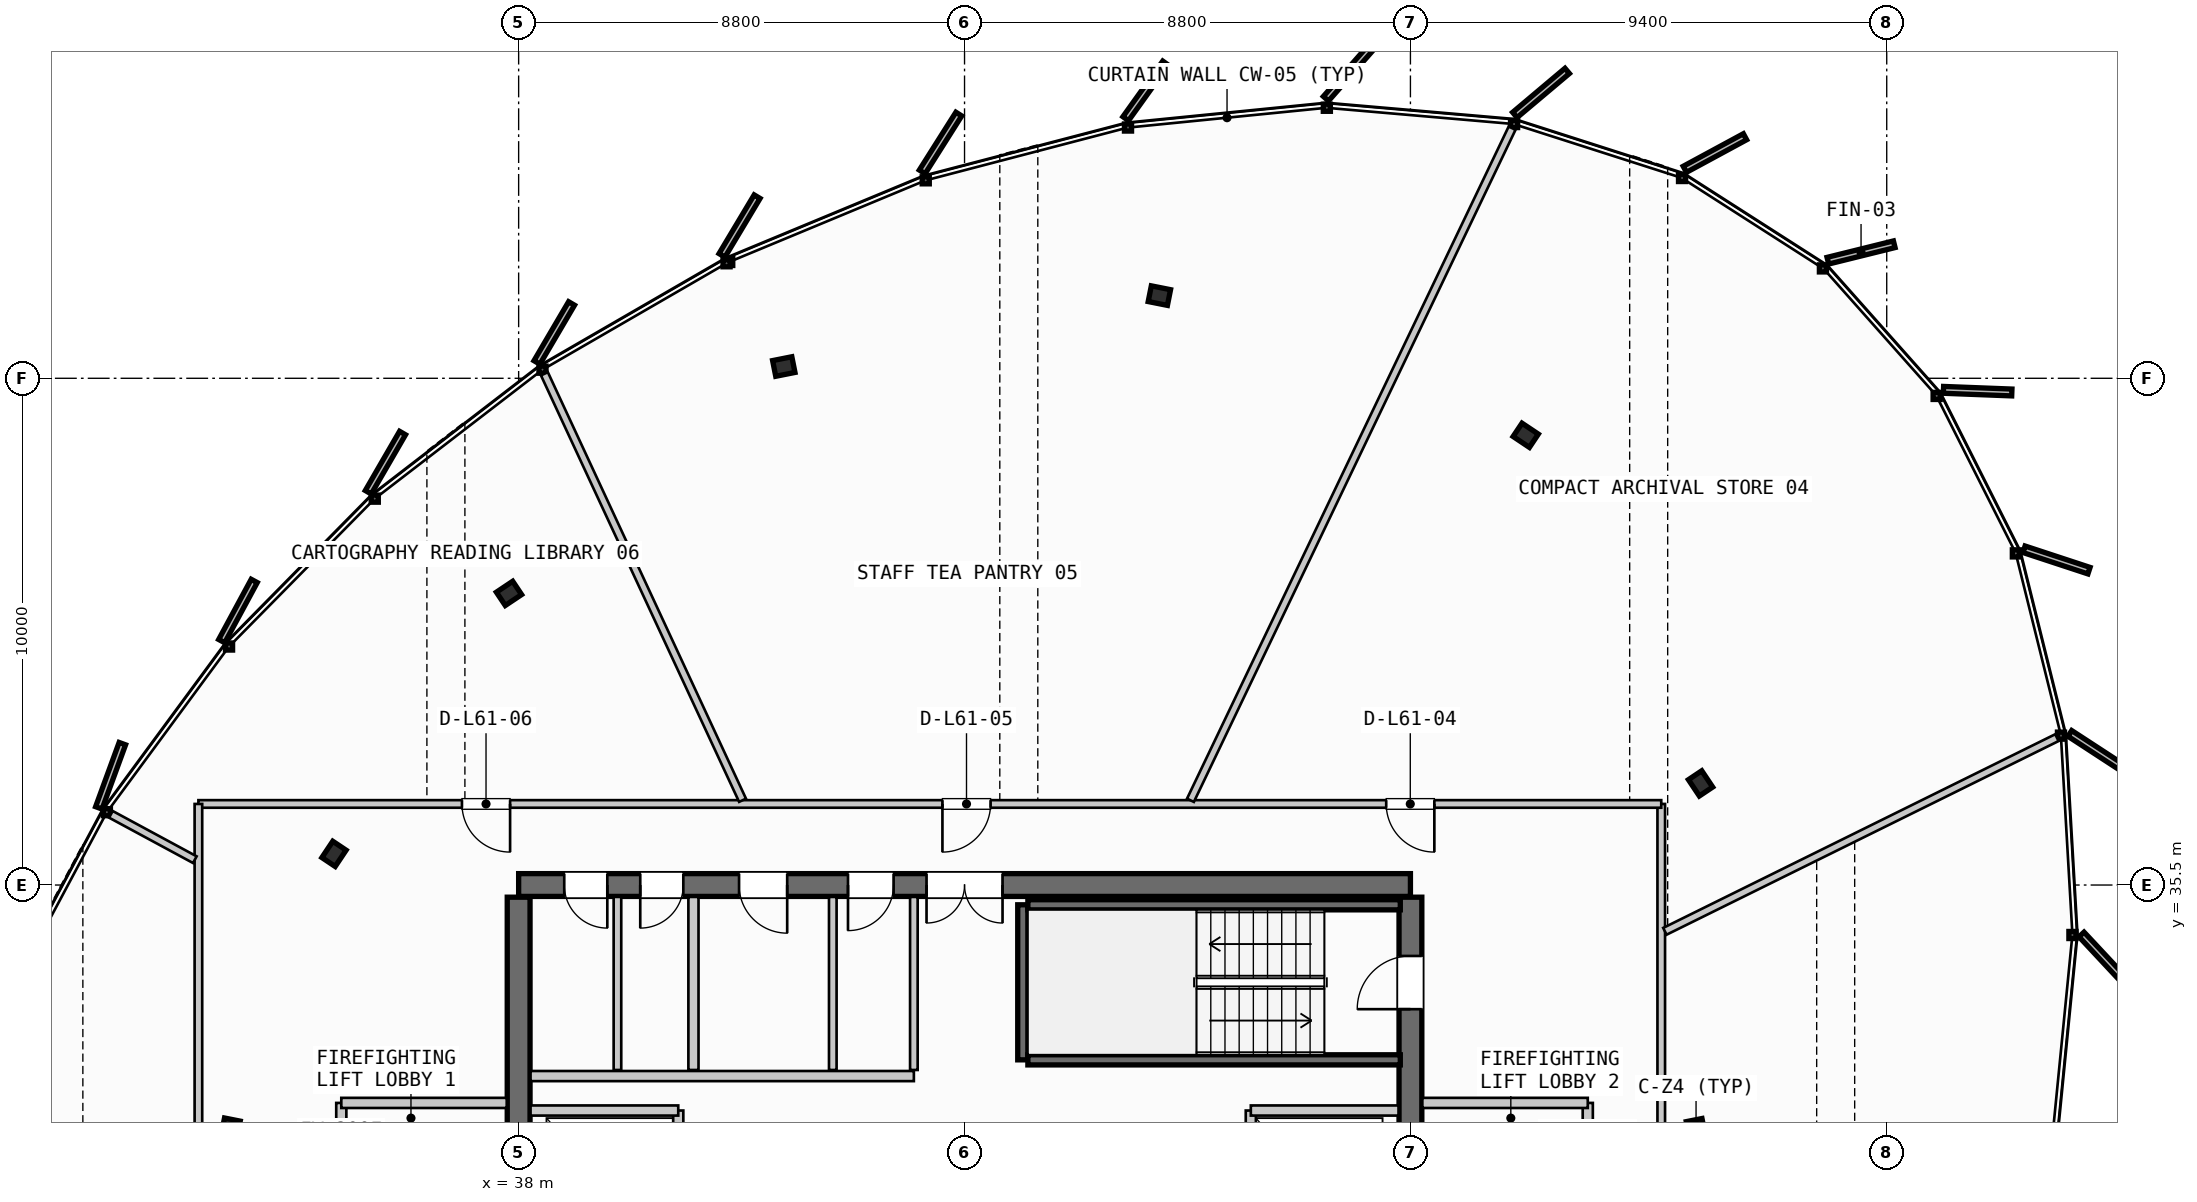
"""IFC4 building model, lengths in metres.
Left out: names, types, materials, properties, quantities, classifications, styles, units other than length and angle.
Written with IfcOpenShell. Run it as: python <this file> out.ifc"""

import sys

from ifc_helpers import new_model, si_unit, direction, frame, frame_2d, origin, origin_2d, place, context, subcontext, project, spatial, rectangle, i_section, extrude, source, transform, mapped, element, fill, save


model = new_model("IFC4")
c1 = context("Model", 3, precision=1e-05, world=origin(), true_north=direction((0.0, 1.0)))
c2 = subcontext(c1, "Body", "Model", "MODEL_VIEW")
j1 = project(units=[si_unit("LENGTHUNIT", "METRE"), si_unit("PLANEANGLEUNIT", "RADIAN")], contexts=[c1])
p1 = place(None, origin())
s1 = spatial("IfcSite", under=j1, at=p1, CompositionType="ELEMENT")
p2 = place(p1, origin())
s2 = spatial("IfcBuilding", under=s1, at=p2, CompositionType="ELEMENT")
p3 = place(p2, frame((0.0, 0.0, 235.3)))
s3 = spatial("IfcBuildingStorey", under=s2, at=p3, CompositionType="ELEMENT", Elevation=235.3)
p4 = place(p3, frame((55.6, 35.5, 0.0), z_axis=(0.0, 0.0, 1.0), x_axis=(-1.0, 0.0, 0.0)))
e1 = element("IfcWall", 1, at=p4, inside=s3, PredefinedType="SHEAR", context=c2, shape_type="SweptSolid", body=[
    extrude(rectangle(XDim=17.6, YDim=0.45, at=frame_2d((8.8, 0.0))), origin(), (0.0, 0.0, 1.0), 3.21),
])
p5 = place(p4, frame((8.05, 0.0, 0.0)))
e2 = element("IfcOpeningElement", 2, at=p5, cuts=e1, PredefinedType="OPENING", context=c2, shape_type="SweptSolid", body=[
    extrude(rectangle(XDim=1.5, YDim=2.2, at=frame_2d((0.75, 1.1))), frame((0.0, 0.235, 0.0), z_axis=(0.0, -1.0, 0.0), x_axis=(1.0, 0.0, 0.0)), (0.0, 0.0, 1.0), 0.47),
])
p6 = place(p4, frame((15.85, 0.0, 0.0)))
e3 = element("IfcOpeningElement", 3, at=p6, cuts=e1, PredefinedType="OPENING", context=c2, shape_type="SweptSolid", body=[
    extrude(rectangle(XDim=0.85, YDim=2.15, at=frame_2d((0.425, 1.075))), frame((0.0, 0.235, 0.0), z_axis=(0.0, -1.0, 0.0), x_axis=(1.0, 0.0, 0.0)), (0.0, 0.0, 1.0), 0.47),
])
p7 = place(p4, frame((14.35, 0.0, 0.0)))
e4 = element("IfcOpeningElement", 4, at=p7, cuts=e1, PredefinedType="OPENING", context=c2, shape_type="SweptSolid", body=[
    extrude(rectangle(XDim=0.85, YDim=2.15, at=frame_2d((0.425, 1.075))), frame((0.0, 0.235, 0.0), z_axis=(0.0, -1.0, 0.0), x_axis=(1.0, 0.0, 0.0)), (0.0, 0.0, 1.0), 0.47),
])
p8 = place(p4, frame((12.3, 0.0, 0.0)))
e5 = element("IfcOpeningElement", 5, at=p8, cuts=e1, PredefinedType="OPENING", context=c2, shape_type="SweptSolid", body=[
    extrude(rectangle(XDim=0.95, YDim=2.15, at=frame_2d((0.475, 1.075))), frame((0.0, 0.235, 0.0), z_axis=(0.0, -1.0, 0.0), x_axis=(1.0, 0.0, 0.0)), (0.0, 0.0, 1.0), 0.47),
])
p9 = place(p4, frame((10.2, 0.0, 0.0)))
e6 = element("IfcOpeningElement", 6, at=p9, cuts=e1, PredefinedType="OPENING", context=c2, shape_type="SweptSolid", body=[
    extrude(rectangle(XDim=0.9, YDim=2.15, at=frame_2d((0.45, 1.075))), frame((0.0, 0.235, 0.0), z_axis=(0.0, -1.0, 0.0), x_axis=(1.0, 0.0, 0.0)), (0.0, 0.0, 1.0), 0.47),
])
p10 = place(p3, frame((38.0, 35.26, 0.0), z_axis=(0.0, 0.0, 1.0), x_axis=(0.0, -1.0, 0.0)))
e7 = element("IfcWall", 7, at=p10, inside=s3, PredefinedType="SHEAR", context=c2, shape_type="SweptSolid", body=[
    extrude(rectangle(XDim=14.92, YDim=0.45, at=frame_2d((7.46, 0.0))), origin(), (0.0, 0.0, 1.0), 3.21),
])
p11 = place(p10, frame((5.21, 0.0, 0.0)))
e8 = element("IfcOpeningElement", 8, at=p11, cuts=e7, PredefinedType="OPENING", context=c2, shape_type="SweptSolid", body=[
    extrude(rectangle(XDim=1.1, YDim=2.2, at=frame_2d((0.55, 1.1))), frame((0.0, 0.235, 0.0), z_axis=(0.0, -1.0, 0.0), x_axis=(1.0, 0.0, 0.0)), (0.0, 0.0, 1.0), 0.47),
])
p12 = place(p3, frame((55.6, 20.34, 0.0), z_axis=(0.0, 0.0, 1.0), x_axis=(0.0, 1.0, 0.0)))
e9 = element("IfcWall", 9, at=p12, inside=s3, PredefinedType="SHEAR", context=c2, shape_type="SweptSolid", body=[
    extrude(rectangle(XDim=14.92, YDim=0.45, at=frame_2d((7.46, 0.0))), origin(), (0.0, 0.0, 1.0), 3.21),
])
p13 = place(p12, frame((12.71, 0.0, 0.0)))
e10 = element("IfcOpeningElement", 10, at=p13, cuts=e9, PredefinedType="OPENING", context=c2, shape_type="SweptSolid", body=[
    extrude(rectangle(XDim=1.05, YDim=2.15, at=frame_2d((0.525, 1.075))), frame((0.0, 0.235, 0.0), z_axis=(0.0, -1.0, 0.0), x_axis=(1.0, 0.0, 0.0)), (0.0, 0.0, 1.0), 0.47),
])
p14 = place(p12, frame((8.61, 0.0, 0.0)))
e11 = element("IfcOpeningElement", 11, at=p14, cuts=e9, PredefinedType="OPENING", context=c2, shape_type="SweptSolid", body=[
    extrude(rectangle(XDim=1.1, YDim=2.2, at=frame_2d((0.55, 1.1))), frame((0.0, 0.235, 0.0), z_axis=(0.0, -1.0, 0.0), x_axis=(1.0, 0.0, 0.0)), (0.0, 0.0, 1.0), 0.47),
])
m1 = source(origin(), c2, "Body", "SweptSolid", [
    extrude(i_section(OverallWidth=0.387, OverallDepth=0.316, WebThickness=0.019, FlangeThickness=0.028, FilletRadius=0.015, at=origin_2d()), origin(), (0.0, 0.0, 1.0), 3.21),
])
for number, where, z_axis, x_axis in (
    (12, (61.237, 30.672, 0.0), (0.0, 0.0, 1.0), (0.981, 0.195, 0.0)),
    (13, (61.326, 37.506, 0.0), (0.0, 0.0, 1.0), (0.831, 0.556, 0.0)),
    (14, (57.875, 44.375, 0.0), (0.0, 0.0, 1.0), (0.556, 0.831, 0.0)),
    (15, (50.645, 47.132, 0.0), (0.0, 0.0, 1.0), (0.195, 0.981, 0.0)),
    (16, (43.233, 45.732, 0.0), (0.0, 0.0, 1.0), (-0.195, 0.981, 0.0)),
    (17, (37.81, 41.255, 0.0), (0.0, 0.0, 1.0), (-0.556, 0.831, 0.0)),
    (18, (34.356, 36.115, 0.0), (0.0, 0.0, 1.0), (-0.831, 0.556, 0.0)),
    (19, (32.312, 30.682, 0.0), (0.0, 0.0, 1.0), (-0.981, 0.195, 0.0)),
):
    element("IfcColumn", number, at=place(p3, frame(where, z_axis=z_axis, x_axis=x_axis)), inside=s3, PredefinedType="COLUMN", context=c2, shape_type="MappedRepresentation", body=[
        mapped(m1, transform((0.0, 0.0, 0.0), scale=1.0)),
    ])
p15 = place(p3, frame((47.95, 32.05, 0.0), z_axis=(0.0, 0.0, 1.0), x_axis=(0.0, 1.0, 0.0)))
e20 = element("IfcWall", 20, at=p15, inside=s3, PredefinedType="SHEAR", context=c2, shape_type="SweptSolid", body=[
    extrude(rectangle(XDim=3.06, YDim=0.2, at=frame_2d((1.53, 0.0))), origin(), (0.0, 0.0, 1.0), 3.21),
])
for number, where, z_axis, x_axis in (
    (21, (48.05, 35.11, 0.0), (0.0, 0.0, 1.0), (1.0, 0.0, 0.0)),
    (22, (55.4, 32.05, 0.0), (0.0, 0.0, 1.0), (-1.0, 0.0, 0.0)),
):
    element("IfcWall", number, at=place(p3, frame(where, z_axis=z_axis, x_axis=x_axis)), inside=s3, PredefinedType="SHEAR", context=c2, shape_type="SweptSolid", body=[
        extrude(rectangle(XDim=7.35, YDim=0.2, at=frame_2d((3.675, 0.0))), origin(), (0.0, 0.0, 1.0), 3.21),
    ])
p16 = place(p3, frame((41.15, 27.95, 0.0), z_axis=(0.0, 0.0, 1.0), x_axis=(0.0, 1.0, 0.0)))
e23 = element("IfcWall", 23, at=p16, inside=s3, PredefinedType="PARTITIONING", context=c2, shape_type="SweptSolid", body=[
    extrude(rectangle(XDim=3.1, YDim=0.2, at=frame_2d((1.55, 0.0))), origin(), (0.0, 0.0, 1.0), 2.28),
])
p17 = place(p3, frame((38.235, 31.05, 0.0), z_axis=(0.0, 0.0, 1.0), x_axis=(1.0, 0.0, 0.0)))
e24 = element("IfcWall", 24, at=p17, inside=s3, PredefinedType="PARTITIONING", context=c2, shape_type="SweptSolid", body=[
    extrude(rectangle(XDim=2.915, YDim=0.2, at=frame_2d((1.458, 0.0))), origin(), (0.0, 0.0, 1.0), 2.28),
])
p18 = place(p3, frame((34.5, 31.2, 0.0), z_axis=(0.0, 0.0, 1.0), x_axis=(0.0, -1.0, 0.0)))
e25 = element("IfcWall", 25, at=p18, inside=s3, PredefinedType="PARTITIONING", context=c2, shape_type="SweptSolid", body=[
    extrude(rectangle(XDim=4.4, YDim=0.2, at=frame_2d((2.2, 0.0))), origin(), (0.0, 0.0, 1.0), 2.28),
])
p19 = place(p18, frame((1.65, 0.0, 0.0)))
e26 = element("IfcOpeningElement", 26, at=p19, cuts=e25, PredefinedType="OPENING", context=c2, shape_type="SweptSolid", body=[
    extrude(rectangle(XDim=1.05, YDim=2.15, at=frame_2d((0.525, 1.075))), frame((0.0, 0.11, 0.0), z_axis=(0.0, -1.0, 0.0), x_axis=(1.0, 0.0, 0.0)), (0.0, 0.0, 1.0), 0.22),
])
p20 = place(p3, frame((34.5, 31.2, 0.0), z_axis=(0.0, 0.0, 1.0), x_axis=(1.0, 0.0, 0.0)))
e27 = element("IfcWall", 27, at=p20, inside=s3, PredefinedType="PARTITIONING", context=c2, shape_type="SweptSolid", body=[
    extrude(rectangle(XDim=3.265, YDim=0.2, at=frame_2d((1.632, 0.0))), origin(), (0.0, 0.0, 1.0), 2.28),
])
p21 = place(p3, frame((52.45, 27.95, 0.0), z_axis=(0.0, 0.0, 1.0), x_axis=(0.0, 1.0, 0.0)))
e28 = element("IfcWall", 28, at=p21, inside=s3, PredefinedType="PARTITIONING", context=c2, shape_type="SweptSolid", body=[
    extrude(rectangle(XDim=3.1, YDim=0.2, at=frame_2d((1.55, 0.0))), origin(), (0.0, 0.0, 1.0), 2.28),
])
p22 = place(p3, frame((52.45, 31.05, 0.0), z_axis=(0.0, 0.0, 1.0), x_axis=(1.0, 0.0, 0.0)))
e29 = element("IfcWall", 29, at=p22, inside=s3, PredefinedType="PARTITIONING", context=c2, shape_type="SweptSolid", body=[
    extrude(rectangle(XDim=2.915, YDim=0.2, at=frame_2d((1.458, 0.0))), origin(), (0.0, 0.0, 1.0), 2.28),
])
p23 = place(p3, frame((59.1, 26.8, 0.0), z_axis=(0.0, 0.0, 1.0), x_axis=(0.0, 1.0, 0.0)))
e30 = element("IfcWall", 30, at=p23, inside=s3, PredefinedType="PARTITIONING", context=c2, shape_type="SweptSolid", body=[
    extrude(rectangle(XDim=4.4, YDim=0.2, at=frame_2d((2.2, 0.0))), origin(), (0.0, 0.0, 1.0), 2.28),
])
p24 = place(p23, frame((1.65, 0.0, 0.0)))
e31 = element("IfcOpeningElement", 31, at=p24, cuts=e30, PredefinedType="OPENING", context=c2, shape_type="SweptSolid", body=[
    extrude(rectangle(XDim=1.05, YDim=2.15, at=frame_2d((0.525, 1.075))), frame((0.0, 0.11, 0.0), z_axis=(0.0, -1.0, 0.0), x_axis=(1.0, 0.0, 0.0)), (0.0, 0.0, 1.0), 0.22),
])
p25 = place(p3, frame((55.835, 31.2, 0.0), z_axis=(0.0, 0.0, 1.0), x_axis=(1.0, 0.0, 0.0)))
e32 = element("IfcWall", 32, at=p25, inside=s3, PredefinedType="PARTITIONING", context=c2, shape_type="SweptSolid", body=[
    extrude(rectangle(XDim=3.265, YDim=0.2, at=frame_2d((1.633, 0.0))), origin(), (0.0, 0.0, 1.0), 2.28),
])
p26 = place(p3, frame((41.45, 31.85, 0.0), z_axis=(0.0, 0.0, 1.0), x_axis=(0.0, 1.0, 0.0)))
e33 = element("IfcWall", 33, at=p26, inside=s3, PredefinedType="PARTITIONING", context=c2, shape_type="SweptSolid", body=[
    extrude(rectangle(XDim=3.415, YDim=0.2, at=frame_2d((1.708, 0.0))), origin(), (0.0, 0.0, 1.0), 2.28),
])
p27 = place(p3, frame((38.235, 31.73, 0.0), z_axis=(0.0, 0.0, 1.0), x_axis=(1.0, 0.0, 0.0)))
e34 = element("IfcWall", 34, at=p27, inside=s3, PredefinedType="PARTITIONING", context=c2, shape_type="SweptSolid", body=[
    extrude(rectangle(XDim=7.565, YDim=0.2, at=frame_2d((3.782, 0.0))), origin(), (0.0, 0.0, 1.0), 2.28),
])
for number, where, z_axis, x_axis in (
    (35, (45.8, 31.85, 0.0), (0.0, 0.0, 1.0), (0.0, 1.0, 0.0)),
    (36, (39.95, 31.85, 0.0), (0.0, 0.0, 1.0), (0.0, 1.0, 0.0)),
):
    element("IfcWall", number, at=place(p3, frame(where, z_axis=z_axis, x_axis=x_axis)), inside=s3, PredefinedType="PARTITIONING", context=c2, shape_type="SweptSolid", body=[
        extrude(rectangle(XDim=3.415, YDim=0.15, at=frame_2d((1.708, 0.0))), origin(), (0.0, 0.0, 1.0), 2.28),
    ])
p28 = place(p3, frame((44.2, 31.85, 0.0), z_axis=(0.0, 0.0, 1.0), x_axis=(0.0, 1.0, 0.0)))
e37 = element("IfcWall", 37, at=p28, inside=s3, PredefinedType="PLUMBINGWALL", context=c2, shape_type="SweptSolid", body=[
    extrude(rectangle(XDim=3.415, YDim=0.15, at=frame_2d((1.708, 0.0))), origin(), (0.0, 0.0, 1.0), 2.28),
])
p29 = place(p3, frame((60.55, 18.269, 0.0), z_axis=(0.0, 0.0, 1.0), x_axis=(0.0, 1.0, 0.0)))
e38 = element("IfcWall", 38, at=p29, inside=s3, PredefinedType="PARTITIONING", context=c2, shape_type="SweptSolid", body=[
    extrude(rectangle(XDim=18.831, YDim=0.15, at=frame_2d((9.416, 0.0))), origin(), (0.0, 0.0, 1.0), 2.28),
])
p30 = place(p29, frame((8.372, 0.0, 0.0)))
e39 = element("IfcOpeningElement", 39, at=p30, cuts=e38, PredefinedType="OPENING", context=c2, shape_type="SweptSolid", body=[
    extrude(rectangle(XDim=0.95, YDim=2.15, at=frame_2d((0.475, 1.075))), frame((0.0, 0.085, 0.0), z_axis=(0.0, -1.0, 0.0), x_axis=(1.0, 0.0, 0.0)), (0.0, 0.0, 1.0), 0.17),
])
p31 = place(p3, frame((60.55, 37.1, 0.0), z_axis=(0.0, 0.0, 1.0), x_axis=(-1.0, 0.0, 0.0)))
e40 = element("IfcWall", 40, at=p31, inside=s3, PredefinedType="PARTITIONING", context=c2, shape_type="SweptSolid", body=[
    extrude(rectangle(XDim=28.87, YDim=0.15, at=frame_2d((14.435, 0.0))), origin(), (0.0, 0.0, 1.0), 2.28),
])
p32 = place(p31, frame((4.478, 0.0, 0.0)))
e41 = element("IfcOpeningElement", 41, at=p32, cuts=e40, PredefinedType="OPENING", context=c2, shape_type="SweptSolid", body=[
    extrude(rectangle(XDim=0.95, YDim=2.15, at=frame_2d((0.475, 1.075))), frame((0.0, 0.085, 0.0), z_axis=(0.0, -1.0, 0.0), x_axis=(1.0, 0.0, 0.0)), (0.0, 0.0, 1.0), 0.17),
])
p33 = place(p31, frame((13.236, 0.0, 0.0)))
e42 = element("IfcOpeningElement", 42, at=p33, cuts=e40, PredefinedType="OPENING", context=c2, shape_type="SweptSolid", body=[
    extrude(rectangle(XDim=0.95, YDim=2.15, at=frame_2d((0.475, 1.075))), frame((0.0, 0.085, 0.0), z_axis=(0.0, -1.0, 0.0), x_axis=(1.0, 0.0, 0.0)), (0.0, 0.0, 1.0), 0.17),
])
p34 = place(p31, frame((22.719, 0.0, 0.0)))
e43 = element("IfcOpeningElement", 43, at=p34, cuts=e40, PredefinedType="OPENING", context=c2, shape_type="SweptSolid", body=[
    extrude(rectangle(XDim=0.95, YDim=2.15, at=frame_2d((0.475, 1.075))), frame((0.0, 0.085, 0.0), z_axis=(0.0, -1.0, 0.0), x_axis=(1.0, 0.0, 0.0)), (0.0, 0.0, 1.0), 0.17),
])
p35 = place(p3, frame((31.68, 37.1, 0.0), z_axis=(0.0, 0.0, 1.0), x_axis=(0.0, -1.0, 0.0)))
e44 = element("IfcWall", 44, at=p35, inside=s3, PredefinedType="PARTITIONING", context=c2, shape_type="SweptSolid", body=[
    extrude(rectangle(XDim=18.831, YDim=0.15, at=frame_2d((9.416, 0.0))), origin(), (0.0, 0.0, 1.0), 2.28),
])
p36 = place(p35, frame((8.132, 0.0, 0.0)))
e45 = element("IfcOpeningElement", 45, at=p36, cuts=e44, PredefinedType="OPENING", context=c2, shape_type="SweptSolid", body=[
    extrude(rectangle(XDim=0.95, YDim=2.15, at=frame_2d((0.475, 1.075))), frame((0.0, 0.085, 0.0), z_axis=(0.0, -1.0, 0.0), x_axis=(1.0, 0.0, 0.0)), (0.0, 0.0, 1.0), 0.17),
])
p37 = place(p3, frame((60.622, 34.586, 0.0), z_axis=(0.0, 0.0, 1.0), x_axis=(0.896583813204, 0.442874097122, 0.0)))
e46 = element("IfcWall", 46, at=p37, inside=s3, PredefinedType="PARTITIONING", context=c2, shape_type="SweptSolid", body=[
    extrude(rectangle(XDim=8.629, YDim=0.15, at=frame_2d((4.315, 0.0))), origin(), (0.0, 0.0, 1.0), 2.28),
])
p38 = place(p3, frame((51.259, 37.172, 0.0), z_axis=(0.0, 0.0, 1.0), x_axis=(0.431686362639, 0.902023771478, 0.0)))
e47 = element("IfcWall", 47, at=p38, inside=s3, PredefinedType="PARTITIONING", context=c2, shape_type="SweptSolid", body=[
    extrude(rectangle(XDim=14.705, YDim=0.15, at=frame_2d((7.353, 0.0))), origin(), (0.0, 0.0, 1.0), 2.28),
])
p39 = place(p3, frame((42.419, 37.173, 0.0), z_axis=(0.0, 0.0, 1.0), x_axis=(-0.4213841455, 0.906882242588, 0.0)))
e48 = element("IfcWall", 48, at=p39, inside=s3, PredefinedType="PARTITIONING", context=c2, shape_type="SweptSolid", body=[
    extrude(rectangle(XDim=9.28, YDim=0.15, at=frame_2d((4.64, 0.0))), origin(), (0.0, 0.0, 1.0), 2.28),
])
p40 = place(p3, frame((31.61, 36.0, 0.0), z_axis=(0.0, 0.0, 1.0), x_axis=(-0.879820822607, 0.475305501868, 0.0)))
e49 = element("IfcWall", 49, at=p40, inside=s3, PredefinedType="PARTITIONING", context=c2, shape_type="SweptSolid", body=[
    extrude(rectangle(XDim=1.883, YDim=0.15, at=frame_2d((0.941, 0.0))), origin(), (0.0, 0.0, 1.0), 2.28),
])
m2 = source(origin(), c2, "Body", "SweptSolid", [
    extrude(rectangle(XDim=1.05, YDim=2.15, at=frame_2d((0.525, 1.075))), frame((0.0, 0.025, 0.0), z_axis=(0.0, -1.0, 0.0), x_axis=(1.0, 0.0, 0.0)), (0.0, 0.0, 1.0), 0.05),
])
p41 = place(p13, origin())
e50 = element("IfcDoor", 50, at=p41, inside=s3, OperationType="SINGLE_SWING_LEFT", PredefinedType="DOOR", context=c2, shape_type="MappedRepresentation", body=[
    mapped(m2, transform((0.0, 0.0, 0.0), scale=1.0)),
])
fill(e10, e50)
m3 = source(origin(), c2, "Body", "SweptSolid", [
    extrude(rectangle(XDim=1.5, YDim=2.2, at=frame_2d((0.75, 1.1))), frame((0.0, 0.025, 0.0), z_axis=(0.0, -1.0, 0.0), x_axis=(1.0, 0.0, 0.0)), (0.0, 0.0, 1.0), 0.05),
])
p42 = place(p5, origin())
e51 = element("IfcDoor", 51, at=p42, inside=s3, OperationType="DOUBLE_DOOR_SINGLE_SWING", PredefinedType="DOOR", context=c2, shape_type="MappedRepresentation", body=[
    mapped(m3, transform((0.0, 0.0, 0.0), scale=1.0)),
])
fill(e2, e51)
m4 = source(origin(), c2, "Body", "SweptSolid", [
    extrude(rectangle(XDim=0.85, YDim=2.15, at=frame_2d((0.425, 1.075))), frame((0.0, 0.025, 0.0), z_axis=(0.0, -1.0, 0.0), x_axis=(1.0, 0.0, 0.0)), (0.0, 0.0, 1.0), 0.05),
])
p43 = place(p6, origin())
e52 = element("IfcDoor", 52, at=p43, inside=s3, OperationType="SINGLE_SWING_LEFT", PredefinedType="DOOR", context=c2, shape_type="MappedRepresentation", body=[
    mapped(m4, transform((0.0, 0.0, 0.0), scale=1.0)),
])
fill(e3, e52)
p44 = place(p7, origin())
e53 = element("IfcDoor", 53, at=p44, inside=s3, OperationType="SINGLE_SWING_RIGHT", PredefinedType="DOOR", context=c2, shape_type="MappedRepresentation", body=[
    mapped(m4, transform((0.0, 0.0, 0.0), scale=1.0)),
])
fill(e4, e53)
m5 = source(origin(), c2, "Body", "SweptSolid", [
    extrude(rectangle(XDim=0.95, YDim=2.15, at=frame_2d((0.475, 1.075))), frame((0.0, 0.025, 0.0), z_axis=(0.0, -1.0, 0.0), x_axis=(1.0, 0.0, 0.0)), (0.0, 0.0, 1.0), 0.05),
])
p45 = place(p8, origin())
e54 = element("IfcDoor", 54, at=p45, inside=s3, OperationType="SINGLE_SWING_LEFT", PredefinedType="DOOR", context=c2, shape_type="MappedRepresentation", body=[
    mapped(m5, transform((0.0, 0.0, 0.0), scale=1.0)),
])
fill(e5, e54)
m6 = source(origin(), c2, "Body", "SweptSolid", [
    extrude(rectangle(XDim=0.9, YDim=2.15, at=frame_2d((0.45, 1.075))), frame((0.0, 0.025, 0.0), z_axis=(0.0, -1.0, 0.0), x_axis=(1.0, 0.0, 0.0)), (0.0, 0.0, 1.0), 0.05),
])
p46 = place(p9, origin())
e55 = element("IfcDoor", 55, at=p46, inside=s3, OperationType="SINGLE_SWING_RIGHT", PredefinedType="DOOR", context=c2, shape_type="MappedRepresentation", body=[
    mapped(m6, transform((0.0, 0.0, 0.0), scale=1.0)),
])
fill(e6, e55)
p47 = place(p32, origin())
e56 = element("IfcDoor", 56, at=p47, inside=s3, OperationType="SINGLE_SWING_LEFT", PredefinedType="DOOR", context=c2, shape_type="MappedRepresentation", body=[
    mapped(m5, transform((0.0, 0.0, 0.0), scale=1.0)),
])
fill(e41, e56)
p48 = place(p33, origin())
e57 = element("IfcDoor", 57, at=p48, inside=s3, OperationType="SINGLE_SWING_RIGHT", PredefinedType="DOOR", context=c2, shape_type="MappedRepresentation", body=[
    mapped(m5, transform((0.0, 0.0, 0.0), scale=1.0)),
])
fill(e42, e57)
p49 = place(p34, origin())
e58 = element("IfcDoor", 58, at=p49, inside=s3, OperationType="SINGLE_SWING_LEFT", PredefinedType="DOOR", context=c2, shape_type="MappedRepresentation", body=[
    mapped(m5, transform((0.0, 0.0, 0.0), scale=1.0)),
])
fill(e43, e58)
save(model, sys.argv[1])
